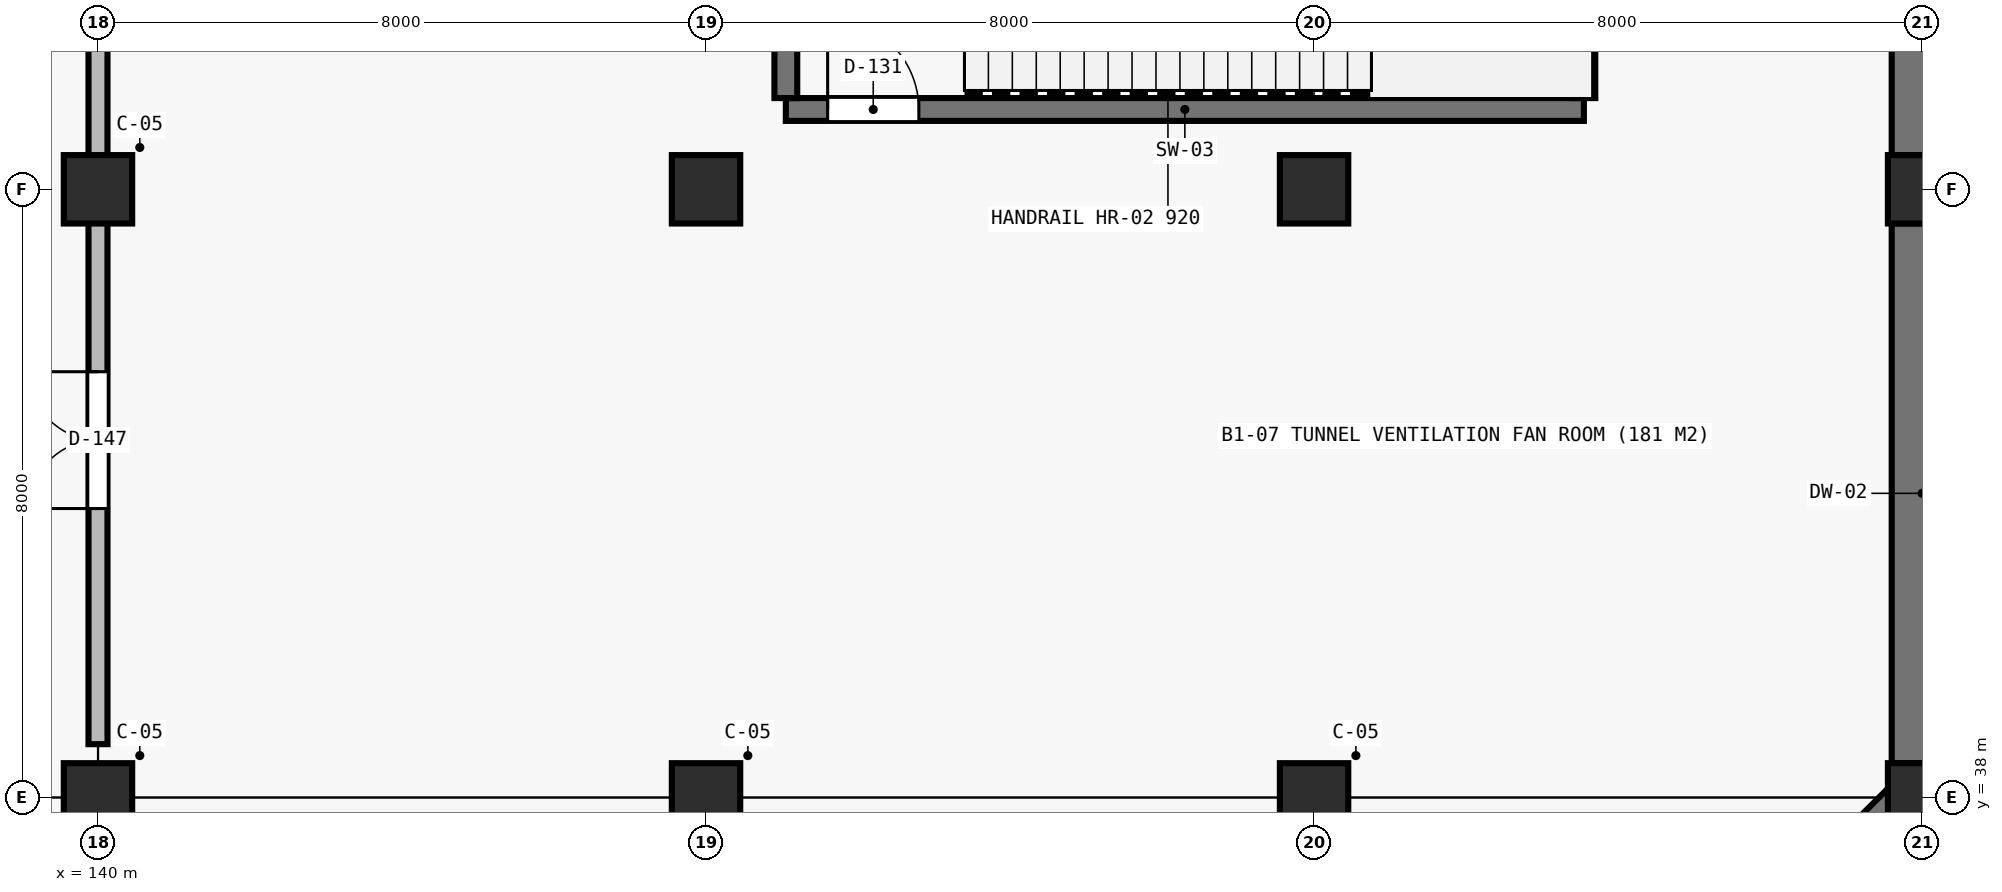
"""IFC4 building model, lengths in metres.
Left out: names, types, materials, properties, quantities, classifications, styles, units other than length and angle.
Written with IfcOpenShell. Run it as: python <this file> out.ifc"""

import sys

from ifc_helpers import new_model, si_unit, direction, frame, frame_2d, origin, origin_2d, place, context, subcontext, project, spatial, rectangle, extrude, element, fill, save


model = new_model("IFC4")
c1 = context("Model", 3, precision=1e-05, world=origin(), true_north=direction((0.0, 1.0)))
c2 = subcontext(c1, "Body", "Model", "MODEL_VIEW")
j1 = project(units=[si_unit("LENGTHUNIT", "METRE"), si_unit("PLANEANGLEUNIT", "RADIAN")], contexts=[c1])
p1 = place(None, origin())
s1 = spatial("IfcSite", under=j1, at=p1, CompositionType="ELEMENT")
p2 = place(p1, origin())
s2 = spatial("IfcBuilding", under=s1, at=p2, CompositionType="ELEMENT")
p3 = place(p2, frame((0.0, 0.0, -6.3)))
s3 = spatial("IfcBuildingStorey", under=s2, at=p3, CompositionType="ELEMENT", Elevation=-6.3)
for number, where, z_axis, x_axis in (
    (1, (140.0, 38.0, 0.0), (0.0, 0.0, 1.0), (1.0, 0.0, 0.0)),
    (2, (140.0, 46.0, 0.0), (0.0, 0.0, 1.0), (1.0, 0.0, 0.0)),
    (3, (148.0, 38.0, 0.0), (0.0, 0.0, 1.0), (1.0, 0.0, 0.0)),
    (4, (148.0, 46.0, 0.0), (0.0, 0.0, 1.0), (1.0, 0.0, 0.0)),
    (5, (156.0, 38.0, 0.0), (0.0, 0.0, 1.0), (1.0, 0.0, 0.0)),
    (6, (156.0, 46.0, 0.0), (0.0, 0.0, 1.0), (1.0, 0.0, 0.0)),
    (7, (164.0, 38.0, 0.0), (0.0, 0.0, 1.0), (1.0, 0.0, 0.0)),
    (8, (164.0, 46.0, 0.0), (0.0, 0.0, 1.0), (1.0, 0.0, 0.0)),
):
    element("IfcColumn", number, at=place(p3, frame(where, z_axis=z_axis, x_axis=x_axis)), inside=s3, PredefinedType="COLUMN", context=c2, shape_type="SweptSolid", body=[
        extrude(rectangle(XDim=0.9, YDim=0.9, at=origin_2d()), origin(), (0.0, 0.0, 1.0), 5.85),
    ])
p4 = place(p3, frame((156.167, 30.167, 0.0), z_axis=(0.0, 0.0, 1.0), x_axis=(0.707106781187, 0.707106781187, 0.0)))
e9 = element("IfcWall", 9, at=p4, inside=s3, PredefinedType="USERDEFINED", context=c2, shape_type="SweptSolid", body=[
    extrude(rectangle(XDim=10.841, YDim=0.8, at=frame_2d((5.42, 0.0))), origin(), (0.0, 0.0, 1.0), 5.85),
])
for number, where, z_axis, x_axis in (
    (10, (164.0, 38.45, 0.0), (0.0, 0.0, 1.0), (0.0, 1.0, 0.0)),
    (11, (164.0, 46.45, 0.0), (0.0, 0.0, 1.0), (0.0, 1.0, 0.0)),
):
    element("IfcWall", number, at=place(p3, frame(where, z_axis=z_axis, x_axis=x_axis)), inside=s3, PredefinedType="USERDEFINED", context=c2, shape_type="SweptSolid", body=[
        extrude(rectangle(XDim=7.1, YDim=0.8, at=frame_2d((3.55, 0.0))), origin(), (0.0, 0.0, 1.0), 5.85),
    ])
p5 = place(p3, frame((149.05, 47.05, 0.0), z_axis=(0.0, 0.0, 1.0), x_axis=(1.0, 0.0, 0.0)))
e12 = element("IfcWall", 12, at=p5, inside=s3, PredefinedType="SHEAR", context=c2, shape_type="SweptSolid", body=[
    extrude(rectangle(XDim=10.5, YDim=0.3, at=frame_2d((5.25, 0.0))), origin(), (0.0, 0.0, 1.0), 5.85),
])
p6 = place(p5, frame((0.55, 0.0, 0.0)))
e13 = element("IfcOpeningElement", 13, at=p6, cuts=e12, PredefinedType="OPENING", context=c2, shape_type="SweptSolid", body=[
    extrude(rectangle(XDim=1.2, YDim=2.2, at=frame_2d((0.6, 1.1))), frame((0.0, 0.16, 0.0), z_axis=(0.0, -1.0, 0.0), x_axis=(1.0, 0.0, 0.0)), (0.0, 0.0, 1.0), 0.32),
])
for number, where, z_axis, x_axis in (
    (14, (149.05, 47.2, 0.0), (0.0, 0.0, 1.0), (0.0, 1.0, 0.0)),
    (15, (159.55, 47.2, 0.0), (0.0, 0.0, 1.0), (0.0, 1.0, 0.0)),
):
    element("IfcWall", number, at=place(p3, frame(where, z_axis=z_axis, x_axis=x_axis)), inside=s3, PredefinedType="SHEAR", context=c2, shape_type="SweptSolid", body=[
        extrude(rectangle(XDim=5.2, YDim=0.3, at=frame_2d((2.6, 0.0))), origin(), (0.0, 0.0, 1.0), 5.85),
    ])
p7 = place(p3, frame((140.0, 38.7, 0.0), z_axis=(0.0, 0.0, 1.0), x_axis=(0.0, 1.0, 0.0)))
e16 = element("IfcWall", 16, at=p7, inside=s3, PredefinedType="SOLIDWALL", context=c2, shape_type="SweptSolid", body=[
    extrude(rectangle(XDim=22.6, YDim=0.25, at=frame_2d((11.3, 0.0))), origin(), (0.0, 0.0, 1.0), 4.45),
])
p8 = place(p7, frame((3.1, 0.0, 0.0)))
e17 = element("IfcOpeningElement", 17, at=p8, cuts=e16, PredefinedType="OPENING", context=c2, shape_type="SweptSolid", body=[
    extrude(rectangle(XDim=1.8, YDim=2.2, at=frame_2d((0.9, 1.1))), frame((0.0, 0.135, 0.0), z_axis=(0.0, -1.0, 0.0), x_axis=(1.0, 0.0, 0.0)), (0.0, 0.0, 1.0), 0.27),
])
p9 = place(p6, origin())
e18 = element("IfcDoor", 18, at=p9, inside=s3, OperationType="SINGLE_SWING_LEFT", PredefinedType="DOOR", context=c2, shape_type="SweptSolid", body=[
    extrude(rectangle(XDim=1.2, YDim=2.2, at=frame_2d((0.6, 1.1))), frame((0.0, 0.025, 0.0), z_axis=(0.0, -1.0, 0.0), x_axis=(1.0, 0.0, 0.0)), (0.0, 0.0, 1.0), 0.05),
])
fill(e13, e18)
p10 = place(p8, origin())
e19 = element("IfcDoor", 19, at=p10, inside=s3, OperationType="DOUBLE_DOOR_SINGLE_SWING", PredefinedType="DOOR", context=c2, shape_type="SweptSolid", body=[
    extrude(rectangle(XDim=1.8, YDim=2.2, at=frame_2d((0.9, 1.1))), frame((0.0, 0.025, 0.0), z_axis=(0.0, -1.0, 0.0), x_axis=(1.0, 0.0, 0.0)), (0.0, 0.0, 1.0), 0.05),
])
fill(e17, e19)
save(model, sys.argv[1])
